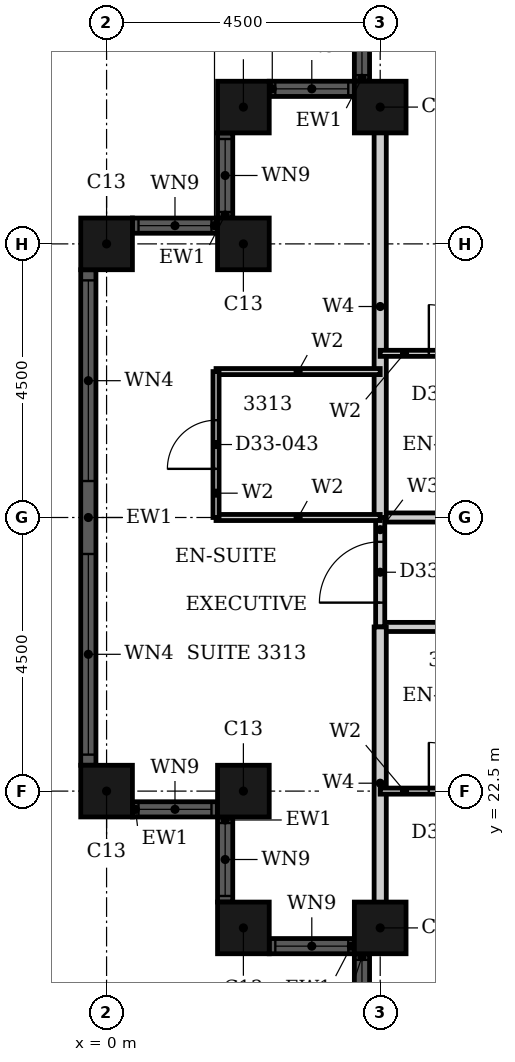
"""IFC4 building model, lengths in metres.
Left out: names, types, materials, properties, quantities, classifications, styles, units other than length and angle.
Written with IfcOpenShell. Run it as: python <this file> out.ifc"""

import sys

from ifc_helpers import new_model, si_unit, direction, frame, frame_2d, origin, origin_2d, place, context, subcontext, project, spatial, rectangle, hollow_rectangle, extrude, element, fill, save


model = new_model("IFC4")
c1 = context("Model", 3, precision=1e-05, world=origin(), true_north=direction((0.0, 1.0)))
c2 = subcontext(c1, "Body", "Model", "MODEL_VIEW")
j1 = project(units=[si_unit("LENGTHUNIT", "METRE"), si_unit("PLANEANGLEUNIT", "RADIAN")], contexts=[c1])
p1 = place(None, origin())
s1 = spatial("IfcSite", under=j1, at=p1, CompositionType="ELEMENT")
p2 = place(p1, origin())
s2 = spatial("IfcBuilding", under=s1, at=p2, CompositionType="ELEMENT")
p3 = place(p2, frame((0.0, 0.0, 133.2)))
s3 = spatial("IfcBuildingStorey", under=s2, at=p3, CompositionType="ELEMENT", Elevation=133.2)
for number, where, z_axis, x_axis in (
    (1, (4.5, 33.75, 0.0), (0.0, 0.0, 1.0), (1.0, 0.0, 0.0)),
    (2, (2.25, 33.75, 0.0), (0.0, 0.0, 1.0), (1.0, 0.0, 0.0)),
    (3, (2.25, 31.5, 0.0), (0.0, 0.0, 1.0), (1.0, 0.0, 0.0)),
    (4, (0.0, 31.5, 0.0), (0.0, 0.0, 1.0), (1.0, 0.0, 0.0)),
    (5, (0.0, 22.5, 0.0), (0.0, 0.0, 1.0), (1.0, 0.0, 0.0)),
    (6, (2.25, 22.5, 0.0), (0.0, 0.0, 1.0), (1.0, 0.0, 0.0)),
    (7, (2.25, 20.25, 0.0), (0.0, 0.0, 1.0), (1.0, 0.0, 0.0)),
    (8, (4.5, 20.25, 0.0), (0.0, 0.0, 1.0), (1.0, 0.0, 0.0)),
):
    element("IfcColumn", number, at=place(p3, frame(where, z_axis=z_axis, x_axis=x_axis)), inside=s3, PredefinedType="COLUMN", context=c2, shape_type="SweptSolid", body=[
        extrude(hollow_rectangle(XDim=0.85, YDim=0.85, WallThickness=0.026, at=origin_2d()), origin(), (0.0, 0.0, 1.0), 3.6),
    ])
p4 = place(p3, frame((4.2, 35.575, 0.0), z_axis=(0.0, 0.0, 1.0), x_axis=(0.0, -1.0, 0.0)))
e9 = element("IfcWall", 9, at=p4, inside=s3, PredefinedType="SOLIDWALL", context=c2, shape_type="SweptSolid", body=[
    extrude(rectangle(XDim=1.4, YDim=0.25, at=frame_2d((0.7, 0.0))), origin(), (0.0, 0.0, 1.0), 3.6),
])
p5 = place(p4, frame((0.1, 0.0, 0.9)))
e10 = element("IfcOpeningElement", 10, at=p5, cuts=e9, PredefinedType="OPENING", context=c2, shape_type="SweptSolid", body=[
    extrude(rectangle(XDim=1.2, YDim=2.08, at=frame_2d((0.6, 1.04))), frame((0.0, 0.135, 0.0), z_axis=(0.0, -1.0, 0.0), x_axis=(1.0, 0.0, 0.0)), (0.0, 0.0, 1.0), 0.27),
])
p6 = place(p3, frame((4.075, 34.05, 0.0), z_axis=(0.0, 0.0, 1.0), x_axis=(-1.0, 0.0, 0.0)))
e11 = element("IfcWall", 11, at=p6, inside=s3, PredefinedType="SOLIDWALL", context=c2, shape_type="SweptSolid", body=[
    extrude(rectangle(XDim=1.4, YDim=0.25, at=frame_2d((0.7, 0.0))), origin(), (0.0, 0.0, 1.0), 3.6),
])
p7 = place(p6, frame((0.1, 0.0, 0.9)))
e12 = element("IfcOpeningElement", 12, at=p7, cuts=e11, PredefinedType="OPENING", context=c2, shape_type="SweptSolid", body=[
    extrude(rectangle(XDim=1.2, YDim=2.08, at=frame_2d((0.6, 1.04))), frame((0.0, 0.135, 0.0), z_axis=(0.0, -1.0, 0.0), x_axis=(1.0, 0.0, 0.0)), (0.0, 0.0, 1.0), 0.27),
])
p8 = place(p3, frame((1.95, 33.325, 0.0), z_axis=(0.0, 0.0, 1.0), x_axis=(0.0, -1.0, 0.0)))
e13 = element("IfcWall", 13, at=p8, inside=s3, PredefinedType="SOLIDWALL", context=c2, shape_type="SweptSolid", body=[
    extrude(rectangle(XDim=1.4, YDim=0.25, at=frame_2d((0.7, 0.0))), origin(), (0.0, 0.0, 1.0), 3.6),
])
p9 = place(p8, frame((0.1, 0.0, 0.9)))
e14 = element("IfcOpeningElement", 14, at=p9, cuts=e13, PredefinedType="OPENING", context=c2, shape_type="SweptSolid", body=[
    extrude(rectangle(XDim=1.2, YDim=2.08, at=frame_2d((0.6, 1.04))), frame((0.0, 0.135, 0.0), z_axis=(0.0, -1.0, 0.0), x_axis=(1.0, 0.0, 0.0)), (0.0, 0.0, 1.0), 0.27),
])
p10 = place(p3, frame((1.825, 31.8, 0.0), z_axis=(0.0, 0.0, 1.0), x_axis=(-1.0, 0.0, 0.0)))
e15 = element("IfcWall", 15, at=p10, inside=s3, PredefinedType="SOLIDWALL", context=c2, shape_type="SweptSolid", body=[
    extrude(rectangle(XDim=1.4, YDim=0.25, at=frame_2d((0.7, 0.0))), origin(), (0.0, 0.0, 1.0), 3.6),
])
p11 = place(p10, frame((0.1, 0.0, 0.9)))
e16 = element("IfcOpeningElement", 16, at=p11, cuts=e15, PredefinedType="OPENING", context=c2, shape_type="SweptSolid", body=[
    extrude(rectangle(XDim=1.2, YDim=2.08, at=frame_2d((0.6, 1.04))), frame((0.0, 0.135, 0.0), z_axis=(0.0, -1.0, 0.0), x_axis=(1.0, 0.0, 0.0)), (0.0, 0.0, 1.0), 0.27),
])
p12 = place(p3, frame((-0.3, 31.075, 0.0), z_axis=(0.0, 0.0, 1.0), x_axis=(0.0, -1.0, 0.0)))
e17 = element("IfcWall", 17, at=p12, inside=s3, PredefinedType="SOLIDWALL", context=c2, shape_type="SweptSolid", body=[
    extrude(rectangle(XDim=8.15, YDim=0.25, at=frame_2d((4.075, 0.0))), origin(), (0.0, 0.0, 1.0), 3.6),
])
p13 = place(p12, frame((0.175, 0.0, 0.9)))
e18 = element("IfcOpeningElement", 18, at=p13, cuts=e17, PredefinedType="OPENING", context=c2, shape_type="SweptSolid", body=[
    extrude(rectangle(XDim=3.3, YDim=2.08, at=frame_2d((1.65, 1.04))), frame((0.0, 0.135, 0.0), z_axis=(0.0, -1.0, 0.0), x_axis=(1.0, 0.0, 0.0)), (0.0, 0.0, 1.0), 0.27),
])
p14 = place(p12, frame((4.675, 0.0, 0.9)))
e19 = element("IfcOpeningElement", 19, at=p14, cuts=e17, PredefinedType="OPENING", context=c2, shape_type="SweptSolid", body=[
    extrude(rectangle(XDim=3.3, YDim=2.08, at=frame_2d((1.65, 1.04))), frame((0.0, 0.135, 0.0), z_axis=(0.0, -1.0, 0.0), x_axis=(1.0, 0.0, 0.0)), (0.0, 0.0, 1.0), 0.27),
])
p15 = place(p3, frame((0.425, 22.2, 0.0), z_axis=(0.0, 0.0, 1.0), x_axis=(1.0, 0.0, 0.0)))
e20 = element("IfcWall", 20, at=p15, inside=s3, PredefinedType="SOLIDWALL", context=c2, shape_type="SweptSolid", body=[
    extrude(rectangle(XDim=1.4, YDim=0.25, at=frame_2d((0.7, 0.0))), origin(), (0.0, 0.0, 1.0), 3.6),
])
p16 = place(p15, frame((0.1, 0.0, 0.9)))
e21 = element("IfcOpeningElement", 21, at=p16, cuts=e20, PredefinedType="OPENING", context=c2, shape_type="SweptSolid", body=[
    extrude(rectangle(XDim=1.2, YDim=2.08, at=frame_2d((0.6, 1.04))), frame((0.0, 0.135, 0.0), z_axis=(0.0, -1.0, 0.0), x_axis=(1.0, 0.0, 0.0)), (0.0, 0.0, 1.0), 0.27),
])
p17 = place(p3, frame((1.95, 22.075, 0.0), z_axis=(0.0, 0.0, 1.0), x_axis=(0.0, -1.0, 0.0)))
e22 = element("IfcWall", 22, at=p17, inside=s3, PredefinedType="SOLIDWALL", context=c2, shape_type="SweptSolid", body=[
    extrude(rectangle(XDim=1.4, YDim=0.25, at=frame_2d((0.7, 0.0))), origin(), (0.0, 0.0, 1.0), 3.6),
])
p18 = place(p17, frame((0.1, 0.0, 0.9)))
e23 = element("IfcOpeningElement", 23, at=p18, cuts=e22, PredefinedType="OPENING", context=c2, shape_type="SweptSolid", body=[
    extrude(rectangle(XDim=1.2, YDim=2.08, at=frame_2d((0.6, 1.04))), frame((0.0, 0.135, 0.0), z_axis=(0.0, -1.0, 0.0), x_axis=(1.0, 0.0, 0.0)), (0.0, 0.0, 1.0), 0.27),
])
p19 = place(p3, frame((2.675, 19.95, 0.0), z_axis=(0.0, 0.0, 1.0), x_axis=(1.0, 0.0, 0.0)))
e24 = element("IfcWall", 24, at=p19, inside=s3, PredefinedType="SOLIDWALL", context=c2, shape_type="SweptSolid", body=[
    extrude(rectangle(XDim=1.4, YDim=0.25, at=frame_2d((0.7, 0.0))), origin(), (0.0, 0.0, 1.0), 3.6),
])
p20 = place(p19, frame((0.1, 0.0, 0.9)))
e25 = element("IfcOpeningElement", 25, at=p20, cuts=e24, PredefinedType="OPENING", context=c2, shape_type="SweptSolid", body=[
    extrude(rectangle(XDim=1.2, YDim=2.08, at=frame_2d((0.6, 1.04))), frame((0.0, 0.135, 0.0), z_axis=(0.0, -1.0, 0.0), x_axis=(1.0, 0.0, 0.0)), (0.0, 0.0, 1.0), 0.27),
])
p21 = place(p3, frame((4.2, 19.825, 0.0), z_axis=(0.0, 0.0, 1.0), x_axis=(0.0, -1.0, 0.0)))
e26 = element("IfcWall", 26, at=p21, inside=s3, PredefinedType="SOLIDWALL", context=c2, shape_type="SweptSolid", body=[
    extrude(rectangle(XDim=1.4, YDim=0.25, at=frame_2d((0.7, 0.0))), origin(), (0.0, 0.0, 1.0), 3.6),
])
p22 = place(p21, frame((0.1, 0.0, 0.9)))
e27 = element("IfcOpeningElement", 27, at=p22, cuts=e26, PredefinedType="OPENING", context=c2, shape_type="SweptSolid", body=[
    extrude(rectangle(XDim=1.2, YDim=2.08, at=frame_2d((0.6, 1.04))), frame((0.0, 0.135, 0.0), z_axis=(0.0, -1.0, 0.0), x_axis=(1.0, 0.0, 0.0)), (0.0, 0.0, 1.0), 0.27),
])
p23 = place(p3, frame((4.5, 25.2, 0.0), z_axis=(0.0, 0.0, 1.0), x_axis=(1.0, 0.0, 0.0)))
e28 = element("IfcWall", 28, at=p23, inside=s3, PredefinedType="PARTITIONING", context=c2, shape_type="SweptSolid", body=[
    extrude(rectangle(XDim=11.7, YDim=0.15, at=frame_2d((5.85, 0.0))), origin(), (0.0, 0.0, 1.0), 3.3),
])
p24 = place(p23, frame((7.45, 0.0, 0.0)))
e29 = element("IfcOpeningElement", 29, at=p24, cuts=e28, PredefinedType="OPENING", context=c2, shape_type="SweptSolid", body=[
    extrude(rectangle(XDim=1.0, YDim=2.1, at=frame_2d((0.5, 1.05))), frame((0.0, 0.085, 0.0), z_axis=(0.0, -1.0, 0.0), x_axis=(1.0, 0.0, 0.0)), (0.0, 0.0, 1.0), 0.17),
])
p25 = place(p23, frame((2.95, 0.0, 0.0)))
e30 = element("IfcOpeningElement", 30, at=p25, cuts=e28, PredefinedType="OPENING", context=c2, shape_type="SweptSolid", body=[
    extrude(rectangle(XDim=1.0, YDim=2.1, at=frame_2d((0.5, 1.05))), frame((0.0, 0.085, 0.0), z_axis=(0.0, -1.0, 0.0), x_axis=(1.0, 0.0, 0.0)), (0.0, 0.0, 1.0), 0.17),
])
p26 = place(p3, frame((4.5, 27.0, 0.0), z_axis=(0.0, 0.0, 1.0), x_axis=(1.0, 0.0, 0.0)))
e31 = element("IfcWall", 31, at=p26, inside=s3, PredefinedType="PARTITIONING", context=c2, shape_type="SweptSolid", body=[
    extrude(rectangle(XDim=11.7, YDim=0.15, at=frame_2d((5.85, 0.0))), origin(), (0.0, 0.0, 1.0), 2.58),
])
p27 = place(p26, frame((6.25, 0.0, 0.0)))
e32 = element("IfcOpeningElement", 32, at=p27, cuts=e31, PredefinedType="OPENING", context=c2, shape_type="SweptSolid", body=[
    extrude(rectangle(XDim=1.0, YDim=2.1, at=frame_2d((0.5, 1.05))), frame((0.0, 0.085, 0.0), z_axis=(0.0, -1.0, 0.0), x_axis=(1.0, 0.0, 0.0)), (0.0, 0.0, 1.0), 0.17),
])
p28 = place(p3, frame((4.5, 25.2, 0.0), z_axis=(0.0, 0.0, 1.0), x_axis=(0.0, 1.0, 0.0)))
e33 = element("IfcWall", 33, at=p28, inside=s3, PredefinedType="PARTITIONING", context=c2, shape_type="SweptSolid", body=[
    extrude(rectangle(XDim=1.8, YDim=0.15, at=frame_2d((0.9, 0.0))), origin(), (0.0, 0.0, 1.0), 3.3),
])
p29 = place(p28, frame((0.4, 0.0, 0.0)))
e34 = element("IfcOpeningElement", 34, at=p29, cuts=e33, PredefinedType="OPENING", context=c2, shape_type="SweptSolid", body=[
    extrude(rectangle(XDim=1.0, YDim=2.1, at=frame_2d((0.5, 1.05))), frame((0.0, 0.085, 0.0), z_axis=(0.0, -1.0, 0.0), x_axis=(1.0, 0.0, 0.0)), (0.0, 0.0, 1.0), 0.17),
])
p30 = place(p3, frame((4.5, 20.06, 0.0), z_axis=(0.0, 0.0, 1.0), x_axis=(0.0, 1.0, 0.0)))
e35 = element("IfcWall", 35, at=p30, inside=s3, PredefinedType="PARTITIONING", context=c2, shape_type="SweptSolid", body=[
    extrude(rectangle(XDim=5.14, YDim=0.2, at=frame_2d((2.57, 0.0))), origin(), (0.0, 0.0, 1.0), 3.3),
])
p31 = place(p3, frame((4.5, 27.0, 0.0), z_axis=(0.0, 0.0, 1.0), x_axis=(0.0, 1.0, 0.0)))
e36 = element("IfcWall", 36, at=p31, inside=s3, PredefinedType="PARTITIONING", context=c2, shape_type="SweptSolid", body=[
    extrude(rectangle(XDim=6.94, YDim=0.2, at=frame_2d((3.47, 0.0))), origin(), (0.0, 0.0, 1.0), 3.3),
])
p32 = place(p3, frame((4.5, 22.5, 0.0), z_axis=(0.0, 0.0, 1.0), x_axis=(1.0, 0.0, 0.0)))
e37 = element("IfcWall", 37, at=p32, inside=s3, PredefinedType="PARTITIONING", context=c2, shape_type="SweptSolid", body=[
    extrude(rectangle(XDim=2.4, YDim=0.1, at=frame_2d((1.2, 0.0))), origin(), (0.0, 0.0, 1.0), 2.58),
])
p33 = place(p32, frame((0.8, 0.0, 0.0)))
e38 = element("IfcOpeningElement", 38, at=p33, cuts=e37, PredefinedType="OPENING", context=c2, shape_type="SweptSolid", body=[
    extrude(rectangle(XDim=0.8, YDim=2.1, at=frame_2d((0.4, 1.05))), frame((0.0, 0.06, 0.0), z_axis=(0.0, -1.0, 0.0), x_axis=(1.0, 0.0, 0.0)), (0.0, 0.0, 1.0), 0.12),
])
p34 = place(p3, frame((1.8, 27.0, 0.0), z_axis=(0.0, 0.0, 1.0), x_axis=(1.0, 0.0, 0.0)))
e39 = element("IfcWall", 39, at=p34, inside=s3, PredefinedType="PARTITIONING", context=c2, shape_type="SweptSolid", body=[
    extrude(rectangle(XDim=2.7, YDim=0.1, at=frame_2d((1.35, 0.0))), origin(), (0.0, 0.0, 1.0), 2.58),
])
p35 = place(p3, frame((1.8, 29.4, 0.0), z_axis=(0.0, 0.0, 1.0), x_axis=(1.0, 0.0, 0.0)))
e40 = element("IfcWall", 40, at=p35, inside=s3, PredefinedType="PARTITIONING", context=c2, shape_type="SweptSolid", body=[
    extrude(rectangle(XDim=2.7, YDim=0.1, at=frame_2d((1.35, 0.0))), origin(), (0.0, 0.0, 1.0), 3.3),
])
p36 = place(p3, frame((4.5, 29.7, 0.0), z_axis=(0.0, 0.0, 1.0), x_axis=(1.0, 0.0, 0.0)))
e41 = element("IfcWall", 41, at=p36, inside=s3, PredefinedType="PARTITIONING", context=c2, shape_type="SweptSolid", body=[
    extrude(rectangle(XDim=2.4, YDim=0.1, at=frame_2d((1.2, 0.0))), origin(), (0.0, 0.0, 1.0), 3.3),
])
p37 = place(p36, frame((0.8, 0.0, 0.0)))
e42 = element("IfcOpeningElement", 42, at=p37, cuts=e41, PredefinedType="OPENING", context=c2, shape_type="SweptSolid", body=[
    extrude(rectangle(XDim=0.8, YDim=2.1, at=frame_2d((0.4, 1.05))), frame((0.0, 0.06, 0.0), z_axis=(0.0, -1.0, 0.0), x_axis=(1.0, 0.0, 0.0)), (0.0, 0.0, 1.0), 0.12),
])
p38 = place(p3, frame((1.8, 27.0, 0.0), z_axis=(0.0, 0.0, 1.0), x_axis=(0.0, 1.0, 0.0)))
e43 = element("IfcWall", 43, at=p38, inside=s3, PredefinedType="PARTITIONING", context=c2, shape_type="SweptSolid", body=[
    extrude(rectangle(XDim=2.4, YDim=0.1, at=frame_2d((1.2, 0.0))), origin(), (0.0, 0.0, 1.0), 3.3),
])
p39 = place(p38, frame((0.8, 0.0, 0.0)))
e44 = element("IfcOpeningElement", 44, at=p39, cuts=e43, PredefinedType="OPENING", context=c2, shape_type="SweptSolid", body=[
    extrude(rectangle(XDim=0.8, YDim=2.1, at=frame_2d((0.4, 1.05))), frame((0.0, 0.06, 0.0), z_axis=(0.0, -1.0, 0.0), x_axis=(1.0, 0.0, 0.0)), (0.0, 0.0, 1.0), 0.12),
])
p40 = place(p5, origin())
e45 = element("IfcWindow", 45, at=p40, inside=s3, PartitioningType="SINGLE_PANEL", PredefinedType="WINDOW", context=c2, shape_type="SweptSolid", body=[
    extrude(rectangle(XDim=1.2, YDim=2.08, at=frame_2d((0.6, 1.04))), frame((0.0, 0.03, 0.0), z_axis=(0.0, -1.0, 0.0), x_axis=(1.0, 0.0, 0.0)), (0.0, 0.0, 1.0), 0.06),
])
fill(e10, e45)
p41 = place(p7, origin())
e46 = element("IfcWindow", 46, at=p41, inside=s3, PartitioningType="SINGLE_PANEL", PredefinedType="WINDOW", context=c2, shape_type="SweptSolid", body=[
    extrude(rectangle(XDim=1.2, YDim=2.08, at=frame_2d((0.6, 1.04))), frame((0.0, 0.03, 0.0), z_axis=(0.0, -1.0, 0.0), x_axis=(1.0, 0.0, 0.0)), (0.0, 0.0, 1.0), 0.06),
])
fill(e12, e46)
p42 = place(p9, origin())
e47 = element("IfcWindow", 47, at=p42, inside=s3, PartitioningType="SINGLE_PANEL", PredefinedType="WINDOW", context=c2, shape_type="SweptSolid", body=[
    extrude(rectangle(XDim=1.2, YDim=2.08, at=frame_2d((0.6, 1.04))), frame((0.0, 0.03, 0.0), z_axis=(0.0, -1.0, 0.0), x_axis=(1.0, 0.0, 0.0)), (0.0, 0.0, 1.0), 0.06),
])
fill(e14, e47)
p43 = place(p11, origin())
e48 = element("IfcWindow", 48, at=p43, inside=s3, PartitioningType="SINGLE_PANEL", PredefinedType="WINDOW", context=c2, shape_type="SweptSolid", body=[
    extrude(rectangle(XDim=1.2, YDim=2.08, at=frame_2d((0.6, 1.04))), frame((0.0, 0.03, 0.0), z_axis=(0.0, -1.0, 0.0), x_axis=(1.0, 0.0, 0.0)), (0.0, 0.0, 1.0), 0.06),
])
fill(e16, e48)
p44 = place(p13, origin())
e49 = element("IfcWindow", 49, at=p44, inside=s3, PartitioningType="SINGLE_PANEL", PredefinedType="WINDOW", context=c2, shape_type="SweptSolid", body=[
    extrude(rectangle(XDim=3.3, YDim=2.08, at=frame_2d((1.65, 1.04))), frame((0.0, 0.03, 0.0), z_axis=(0.0, -1.0, 0.0), x_axis=(1.0, 0.0, 0.0)), (0.0, 0.0, 1.0), 0.06),
])
fill(e18, e49)
p45 = place(p14, origin())
e50 = element("IfcWindow", 50, at=p45, inside=s3, PartitioningType="SINGLE_PANEL", PredefinedType="WINDOW", context=c2, shape_type="SweptSolid", body=[
    extrude(rectangle(XDim=3.3, YDim=2.08, at=frame_2d((1.65, 1.04))), frame((0.0, 0.03, 0.0), z_axis=(0.0, -1.0, 0.0), x_axis=(1.0, 0.0, 0.0)), (0.0, 0.0, 1.0), 0.06),
])
fill(e19, e50)
p46 = place(p16, origin())
e51 = element("IfcWindow", 51, at=p46, inside=s3, PartitioningType="SINGLE_PANEL", PredefinedType="WINDOW", context=c2, shape_type="SweptSolid", body=[
    extrude(rectangle(XDim=1.2, YDim=2.08, at=frame_2d((0.6, 1.04))), frame((0.0, 0.03, 0.0), z_axis=(0.0, -1.0, 0.0), x_axis=(1.0, 0.0, 0.0)), (0.0, 0.0, 1.0), 0.06),
])
fill(e21, e51)
p47 = place(p18, origin())
e52 = element("IfcWindow", 52, at=p47, inside=s3, PartitioningType="SINGLE_PANEL", PredefinedType="WINDOW", context=c2, shape_type="SweptSolid", body=[
    extrude(rectangle(XDim=1.2, YDim=2.08, at=frame_2d((0.6, 1.04))), frame((0.0, 0.03, 0.0), z_axis=(0.0, -1.0, 0.0), x_axis=(1.0, 0.0, 0.0)), (0.0, 0.0, 1.0), 0.06),
])
fill(e23, e52)
p48 = place(p20, origin())
e53 = element("IfcWindow", 53, at=p48, inside=s3, PartitioningType="SINGLE_PANEL", PredefinedType="WINDOW", context=c2, shape_type="SweptSolid", body=[
    extrude(rectangle(XDim=1.2, YDim=2.08, at=frame_2d((0.6, 1.04))), frame((0.0, 0.03, 0.0), z_axis=(0.0, -1.0, 0.0), x_axis=(1.0, 0.0, 0.0)), (0.0, 0.0, 1.0), 0.06),
])
fill(e25, e53)
p49 = place(p22, origin())
e54 = element("IfcWindow", 54, at=p49, inside=s3, PartitioningType="SINGLE_PANEL", PredefinedType="WINDOW", context=c2, shape_type="SweptSolid", body=[
    extrude(rectangle(XDim=1.2, YDim=2.08, at=frame_2d((0.6, 1.04))), frame((0.0, 0.03, 0.0), z_axis=(0.0, -1.0, 0.0), x_axis=(1.0, 0.0, 0.0)), (0.0, 0.0, 1.0), 0.06),
])
fill(e27, e54)
p50 = place(p33, origin())
e55 = element("IfcDoor", 55, at=p50, inside=s3, OperationType="SINGLE_SWING_RIGHT", PredefinedType="DOOR", context=c2, shape_type="SweptSolid", body=[
    extrude(rectangle(XDim=0.8, YDim=2.1, at=frame_2d((0.4, 1.05))), frame((0.0, 0.025, 0.0), z_axis=(0.0, -1.0, 0.0), x_axis=(1.0, 0.0, 0.0)), (0.0, 0.0, 1.0), 0.05),
])
fill(e38, e55)
p51 = place(p37, origin())
e56 = element("IfcDoor", 56, at=p51, inside=s3, OperationType="SINGLE_SWING_LEFT", PredefinedType="DOOR", context=c2, shape_type="SweptSolid", body=[
    extrude(rectangle(XDim=0.8, YDim=2.1, at=frame_2d((0.4, 1.05))), frame((0.0, 0.025, 0.0), z_axis=(0.0, -1.0, 0.0), x_axis=(1.0, 0.0, 0.0)), (0.0, 0.0, 1.0), 0.05),
])
fill(e42, e56)
p52 = place(p29, origin())
e57 = element("IfcDoor", 57, at=p52, inside=s3, OperationType="SINGLE_SWING_LEFT", PredefinedType="DOOR", context=c2, shape_type="SweptSolid", body=[
    extrude(rectangle(XDim=1.0, YDim=2.1, at=frame_2d((0.5, 1.05))), frame((0.0, 0.025, 0.0), z_axis=(0.0, -1.0, 0.0), x_axis=(1.0, 0.0, 0.0)), (0.0, 0.0, 1.0), 0.05),
])
fill(e34, e57)
p53 = place(p39, origin())
e58 = element("IfcDoor", 58, at=p53, inside=s3, OperationType="SINGLE_SWING_RIGHT", PredefinedType="DOOR", context=c2, shape_type="SweptSolid", body=[
    extrude(rectangle(XDim=0.8, YDim=2.1, at=frame_2d((0.4, 1.05))), frame((0.0, 0.025, 0.0), z_axis=(0.0, -1.0, 0.0), x_axis=(1.0, 0.0, 0.0)), (0.0, 0.0, 1.0), 0.05),
])
fill(e44, e58)
save(model, sys.argv[1])
